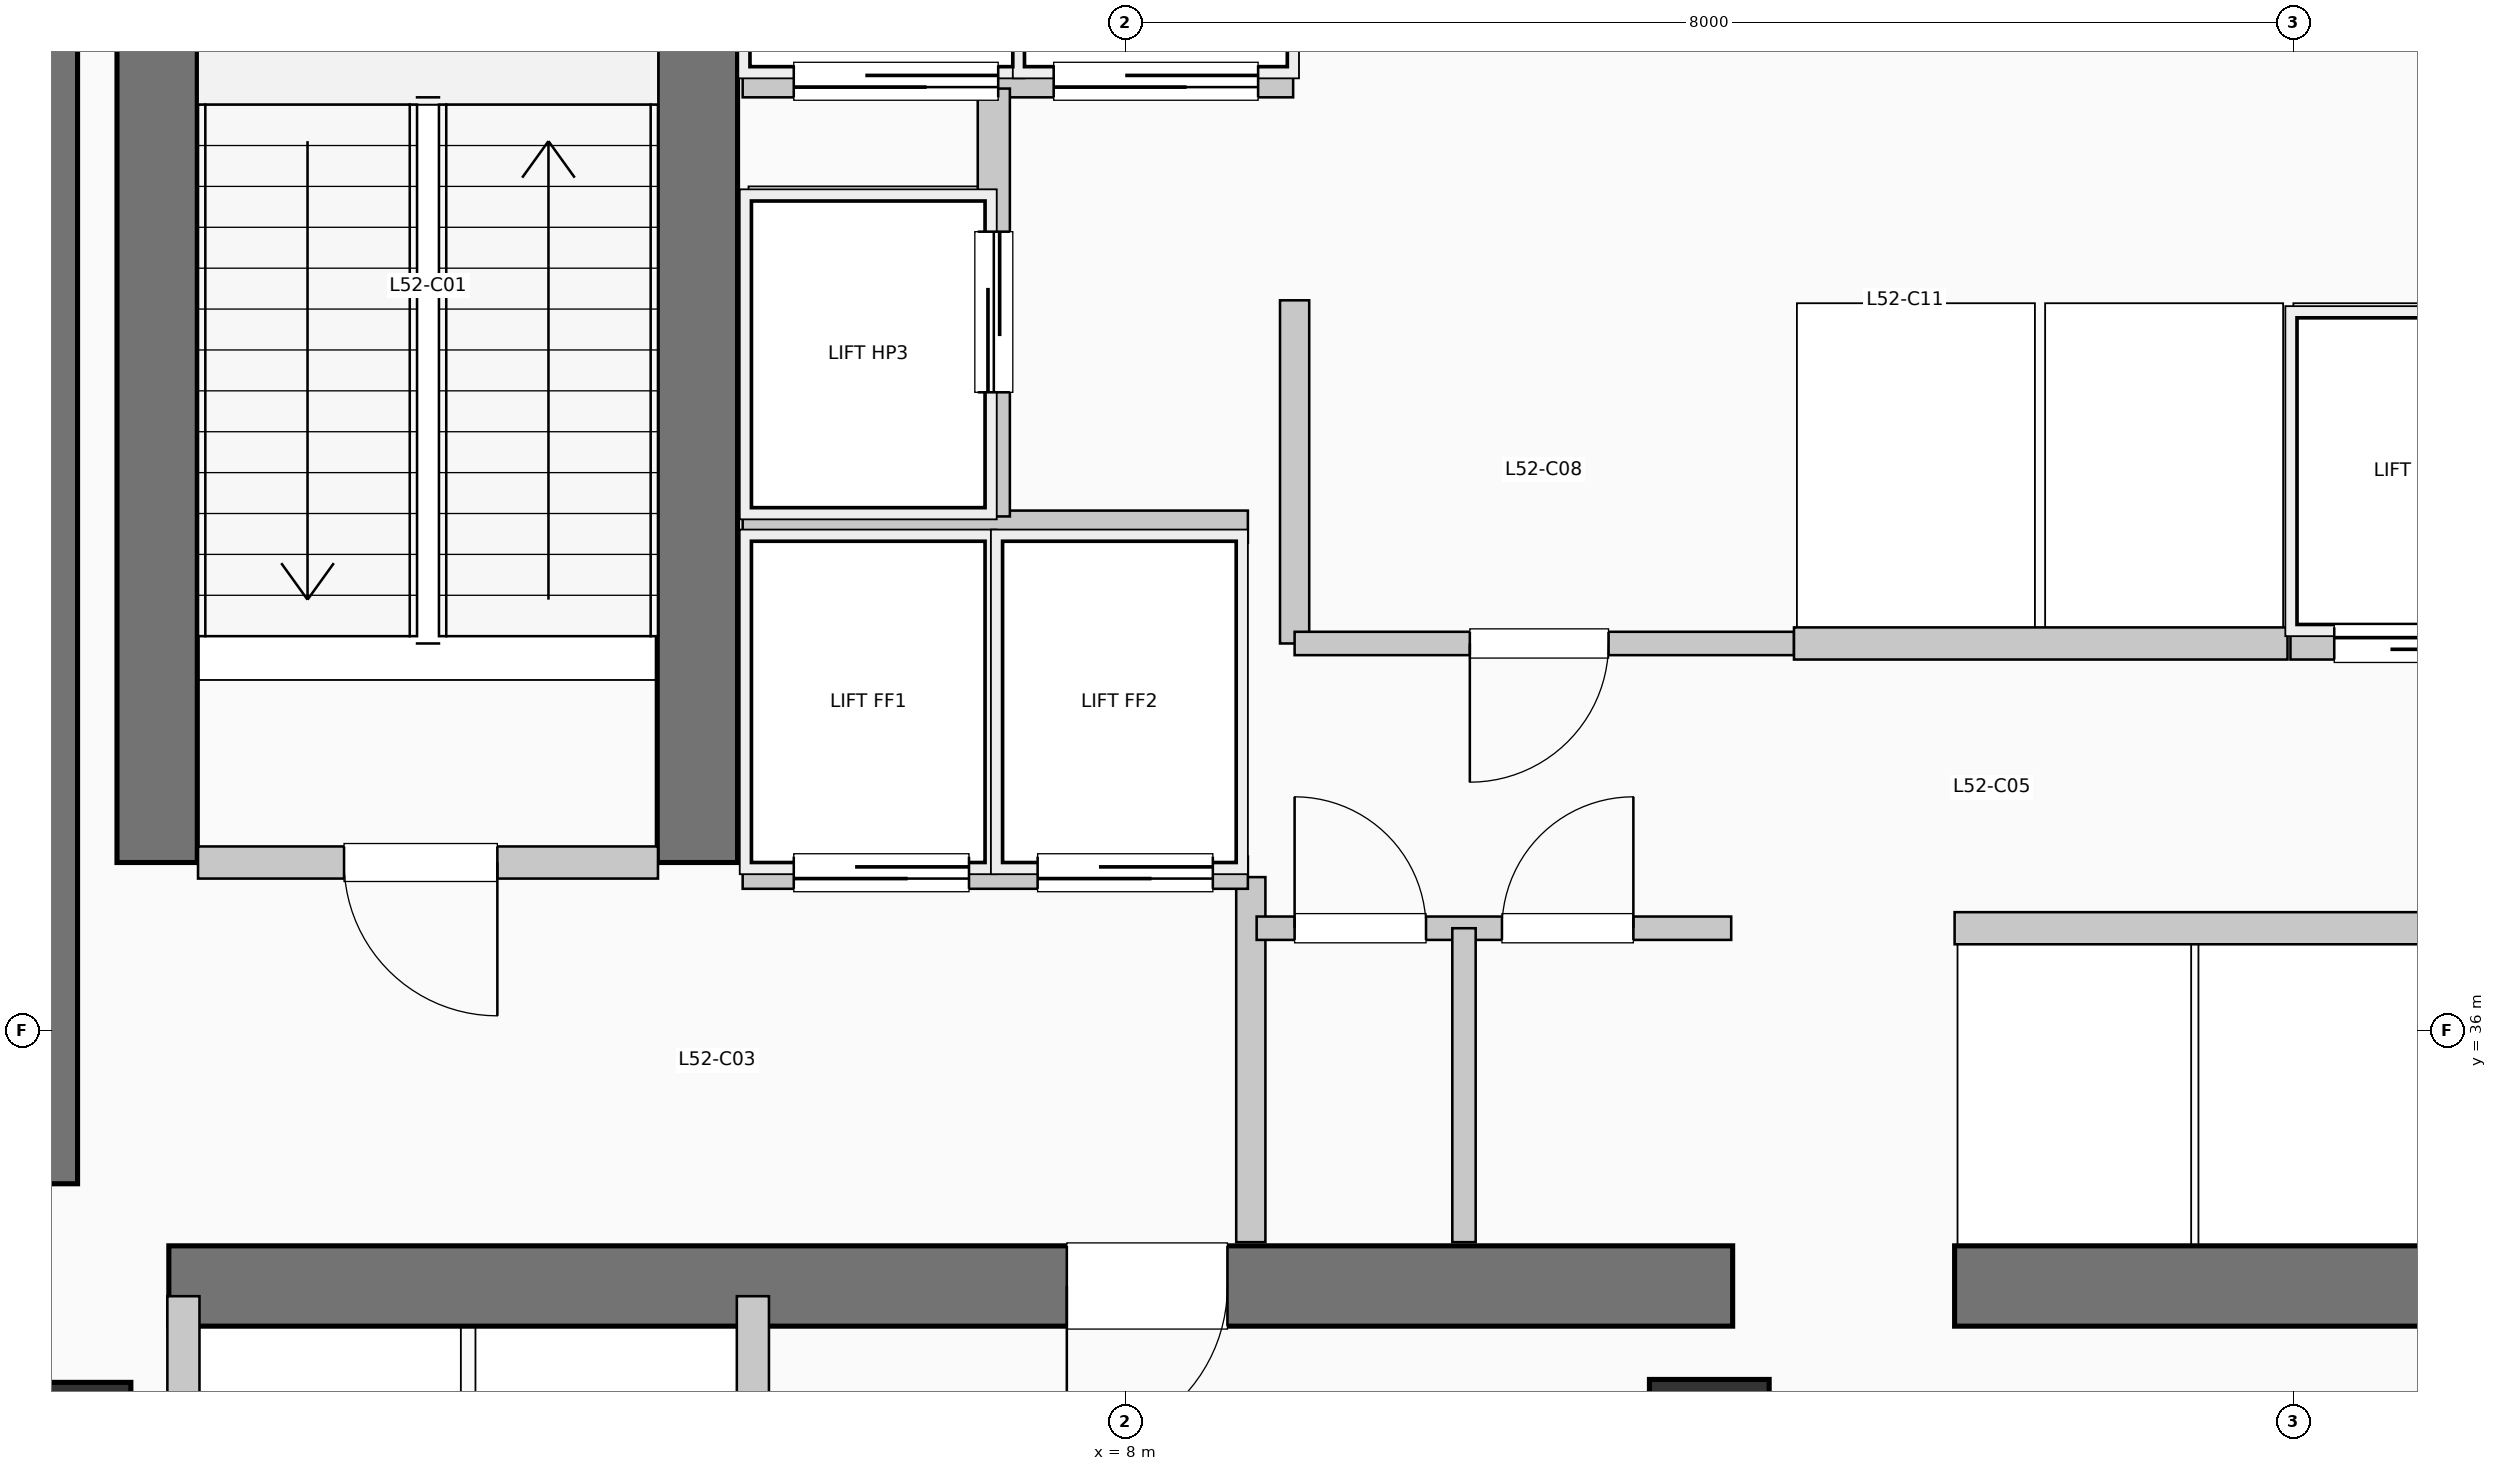
"""IFC4 building model, lengths in metres.
Left out: names, types, materials, properties, quantities, classifications, styles, units other than length and angle.
Written with IfcOpenShell. Run it as: python <this file> out.ifc"""

import sys

from ifc_helpers import new_model, si_unit, direction, frame, frame_2d, origin, origin_2d, place, context, subcontext, project, spatial, rectangle, extrude, element, fill, save


model = new_model("IFC4")
c1 = context("Model", 3, precision=1e-05, world=origin(), true_north=direction((0.0, 1.0)))
c2 = subcontext(c1, "Body", "Model", "MODEL_VIEW")
j1 = project(units=[si_unit("LENGTHUNIT", "METRE"), si_unit("PLANEANGLEUNIT", "RADIAN")], contexts=[c1])
p1 = place(None, origin())
s1 = spatial("IfcSite", under=j1, at=p1, CompositionType="ELEMENT")
p2 = place(p1, origin())
s2 = spatial("IfcBuilding", under=s1, at=p2, CompositionType="ELEMENT")
p3 = place(p2, frame((0.0, 0.0, 215.16)))
s3 = spatial("IfcBuildingStorey", under=s2, at=p3, CompositionType="ELEMENT", Elevation=215.16)
p4 = place(p3, frame((0.5, 34.95, 0.0), z_axis=(0.0, 0.0, 1.0), x_axis=(0.0, 1.0, 0.0)))
e1 = element("IfcWall", 1, at=p4, inside=s3, PredefinedType="SHEAR", context=c2, shape_type="SweptSolid", body=[
    extrude(rectangle(XDim=7.9, YDim=0.65, at=frame_2d((3.95, 0.0))), origin(), (0.0, 0.0, 1.0), 4.62),
])
p5 = place(p3, frame((1.45, 34.25, 0.0), z_axis=(0.0, 0.0, 1.0), x_axis=(1.0, 0.0, 0.0)))
e2 = element("IfcWall", 2, at=p5, inside=s3, PredefinedType="SHEAR", context=c2, shape_type="SweptSolid", body=[
    extrude(rectangle(XDim=10.71, YDim=0.55, at=frame_2d((5.355, 0.0))), origin(), (0.0, 0.0, 1.0), 4.62),
])
p6 = place(p5, frame((7.25, 0.0, 0.0), z_axis=(0.0, 0.0, 1.0), x_axis=(-1.0, 0.0, 0.0)))
e3 = element("IfcOpeningElement", 3, at=p6, cuts=e2, PredefinedType="OPENING", context=c2, shape_type="SweptSolid", body=[
    extrude(rectangle(XDim=1.1, YDim=2.15, at=frame_2d((0.55, 1.075))), frame((0.0, 0.285, 0.0), z_axis=(0.0, -1.0, 0.0), x_axis=(1.0, 0.0, 0.0)), (0.0, 0.0, 1.0), 0.57),
])
p7 = place(p3, frame((13.68, 34.25, 0.0), z_axis=(0.0, 0.0, 1.0), x_axis=(1.0, 0.0, 0.0)))
e4 = element("IfcWall", 4, at=p7, inside=s3, PredefinedType="SHEAR", context=c2, shape_type="SweptSolid", body=[
    extrude(rectangle(XDim=6.12, YDim=0.55, at=frame_2d((3.06, 0.0))), origin(), (0.0, 0.0, 1.0), 4.62),
])
for number, where, z_axis, x_axis in (
    (5, (1.37, 37.15, 0.0), (0.0, 0.0, 1.0), (0.0, 1.0, 0.0)),
    (6, (5.07, 37.15, 0.0), (0.0, 0.0, 1.0), (0.0, 1.0, 0.0)),
):
    element("IfcWall", number, at=place(p3, frame(where, z_axis=z_axis, x_axis=x_axis)), inside=s3, PredefinedType="SHEAR", context=c2, shape_type="SweptSolid", body=[
        extrude(rectangle(XDim=7.89, YDim=0.55, at=frame_2d((3.945, 0.0))), origin(), (0.0, 0.0, 1.0), 4.62),
    ])
p8 = place(p3, frame((0.8, 33.2, 0.0), z_axis=(0.0, 0.0, 1.0), x_axis=(1.0, 0.0, 0.0)))
e7 = element("IfcColumn", 7, at=p8, inside=s3, PredefinedType="COLUMN", context=c2, shape_type="SweptSolid", body=[
    extrude(rectangle(XDim=0.78, YDim=0.78, at=origin_2d()), origin(), (0.0, 0.0, 1.0), 4.62),
])
p9 = place(p3, frame((12.0, 33.2, 0.0), z_axis=(0.0, 0.0, 1.0), x_axis=(1.0, 0.0, 0.0)))
e8 = element("IfcColumn", 8, at=p9, inside=s3, PredefinedType="COLUMN", context=c2, shape_type="SweptSolid", body=[
    extrude(rectangle(XDim=0.82, YDim=0.82, at=origin_2d()), origin(), (0.0, 0.0, 1.0), 4.62),
])
p10 = place(p3, frame((1.65, 37.15, 0.0), z_axis=(0.0, 0.0, 1.0), x_axis=(1.0, 0.0, 0.0)))
e9 = element("IfcWall", 9, at=p10, inside=s3, PredefinedType="PARTITIONING", context=c2, shape_type="SweptSolid", body=[
    extrude(rectangle(XDim=3.15, YDim=0.22, at=frame_2d((1.575, 0.0))), origin(), (0.0, 0.0, 1.0), 4.37),
])
p11 = place(p10, frame((2.05, 0.0, 0.0), z_axis=(0.0, 0.0, 1.0), x_axis=(-1.0, 0.0, 0.0)))
e10 = element("IfcOpeningElement", 10, at=p11, cuts=e9, PredefinedType="OPENING", context=c2, shape_type="SweptSolid", body=[
    extrude(rectangle(XDim=1.05, YDim=2.15, at=frame_2d((0.525, 1.075))), frame((0.0, 0.12, 0.0), z_axis=(0.0, -1.0, 0.0), x_axis=(1.0, 0.0, 0.0)), (0.0, 0.0, 1.0), 0.24),
])
p12 = place(p3, frame((8.86, 34.55, 0.0), z_axis=(0.0, 0.0, 1.0), x_axis=(0.0, 1.0, 0.0)))
e11 = element("IfcWall", 11, at=p12, inside=s3, PredefinedType="PARTITIONING", context=c2, shape_type="SweptSolid", body=[
    extrude(rectangle(XDim=2.5, YDim=0.2, at=frame_2d((1.25, 0.0))), origin(), (0.0, 0.0, 1.0), 4.37),
])
p13 = place(p3, frame((5.38, 37.08, 0.0), z_axis=(0.0, 0.0, 1.0), x_axis=(1.0, 0.0, 0.0)))
e12 = element("IfcWall", 12, at=p13, inside=s3, PredefinedType="PARTITIONING", context=c2, shape_type="SweptSolid", body=[
    extrude(rectangle(XDim=3.46, YDim=0.22, at=frame_2d((1.73, 0.0))), origin(), (0.0, 0.0, 1.0), 4.37),
])
p14 = place(p13, frame((1.55, 0.0, 0.0), z_axis=(0.0, 0.0, 1.0), x_axis=(-1.0, 0.0, 0.0)))
e13 = element("IfcOpeningElement", 13, at=p14, cuts=e12, PredefinedType="OPENING", context=c2, shape_type="SweptSolid", body=[
    extrude(rectangle(XDim=1.2, YDim=2.2, at=frame_2d((0.6, 1.1))), frame((0.0, 0.12, 0.0), z_axis=(0.0, -1.0, 0.0), x_axis=(1.0, 0.0, 0.0)), (0.0, 0.0, 1.0), 0.24),
])
p15 = place(p13, frame((3.22, 0.0, 0.0), z_axis=(0.0, 0.0, 1.0), x_axis=(-1.0, 0.0, 0.0)))
e14 = element("IfcOpeningElement", 14, at=p15, cuts=e12, PredefinedType="OPENING", context=c2, shape_type="SweptSolid", body=[
    extrude(rectangle(XDim=1.2, YDim=2.2, at=frame_2d((0.6, 1.1))), frame((0.0, 0.12, 0.0), z_axis=(0.0, -1.0, 0.0), x_axis=(1.0, 0.0, 0.0)), (0.0, 0.0, 1.0), 0.24),
])
p16 = place(p3, frame((5.38, 39.45, 0.0), z_axis=(0.0, 0.0, 1.0), x_axis=(1.0, 0.0, 0.0)))
e15 = element("IfcWall", 15, at=p16, inside=s3, PredefinedType="PARTITIONING", context=c2, shape_type="SweptSolid", body=[
    extrude(rectangle(XDim=3.46, YDim=0.22, at=frame_2d((1.73, 0.0))), origin(), (0.0, 0.0, 1.0), 4.37),
])
p17 = place(p3, frame((5.38, 42.5, 0.0), z_axis=(0.0, 0.0, 1.0), x_axis=(1.0, 0.0, 0.0)))
e16 = element("IfcWall", 16, at=p17, inside=s3, PredefinedType="PARTITIONING", context=c2, shape_type="SweptSolid", body=[
    extrude(rectangle(XDim=3.77, YDim=0.22, at=frame_2d((1.885, 0.0))), origin(), (0.0, 0.0, 1.0), 4.37),
])
p18 = place(p17, frame((1.75, 0.0, 0.0), z_axis=(0.0, 0.0, 1.0), x_axis=(-1.0, 0.0, 0.0)))
e17 = element("IfcOpeningElement", 17, at=p18, cuts=e16, PredefinedType="OPENING", context=c2, shape_type="SweptSolid", body=[
    extrude(rectangle(XDim=1.4, YDim=2.2, at=frame_2d((0.7, 1.1))), frame((0.0, 0.12, 0.0), z_axis=(0.0, -1.0, 0.0), x_axis=(1.0, 0.0, 0.0)), (0.0, 0.0, 1.0), 0.24),
])
p19 = place(p17, frame((3.53, 0.0, 0.0), z_axis=(0.0, 0.0, 1.0), x_axis=(-1.0, 0.0, 0.0)))
e18 = element("IfcOpeningElement", 18, at=p19, cuts=e16, PredefinedType="OPENING", context=c2, shape_type="SweptSolid", body=[
    extrude(rectangle(XDim=1.4, YDim=2.2, at=frame_2d((0.7, 1.1))), frame((0.0, 0.12, 0.0), z_axis=(0.0, -1.0, 0.0), x_axis=(1.0, 0.0, 0.0)), (0.0, 0.0, 1.0), 0.24),
])
p20 = place(p3, frame((7.1, 39.52, 0.0), z_axis=(0.0, 0.0, 1.0), x_axis=(0.0, 1.0, 0.0)))
e19 = element("IfcWall", 19, at=p20, inside=s3, PredefinedType="PARTITIONING", context=c2, shape_type="SweptSolid", body=[
    extrude(rectangle(XDim=2.93, YDim=0.22, at=frame_2d((1.465, 0.0))), origin(), (0.0, 0.0, 1.0), 4.37),
])
p21 = place(p20, frame((0.85, 0.0, 0.0)))
e20 = element("IfcOpeningElement", 20, at=p21, cuts=e19, PredefinedType="OPENING", context=c2, shape_type="SweptSolid", body=[
    extrude(rectangle(XDim=1.1, YDim=2.2, at=frame_2d((0.55, 1.1))), frame((0.0, 0.12, 0.0), z_axis=(0.0, -1.0, 0.0), x_axis=(1.0, 0.0, 0.0)), (0.0, 0.0, 1.0), 0.24),
])
for number, where, z_axis, x_axis in (
    (21, (1.55, 31.8, 0.0), (0.0, 0.0, 1.0), (0.0, 1.0, 0.0)),
    (22, (5.45, 31.8, 0.0), (0.0, 0.0, 1.0), (0.0, 1.0, 0.0)),
):
    element("IfcWall", number, at=place(p3, frame(where, z_axis=z_axis, x_axis=x_axis)), inside=s3, PredefinedType="PARTITIONING", context=c2, shape_type="SweptSolid", body=[
        extrude(rectangle(XDim=2.38, YDim=0.22, at=frame_2d((1.19, 0.0))), origin(), (0.0, 0.0, 1.0), 4.37),
    ])
p22 = place(p3, frame((9.16, 38.65, 0.0), z_axis=(0.0, 0.0, 1.0), x_axis=(0.0, 1.0, 0.0)))
e23 = element("IfcWall", 23, at=p22, inside=s3, PredefinedType="PARTITIONING", context=c2, shape_type="SweptSolid", body=[
    extrude(rectangle(XDim=2.35, YDim=0.2, at=frame_2d((1.175, 0.0))), origin(), (0.0, 0.0, 1.0), 4.37),
])
p23 = place(p3, frame((8.9, 36.7, 0.0), z_axis=(0.0, 0.0, 1.0), x_axis=(1.0, 0.0, 0.0)))
e24 = element("IfcWall", 24, at=p23, inside=s3, PredefinedType="PARTITIONING", context=c2, shape_type="SweptSolid", body=[
    extrude(rectangle(XDim=3.25, YDim=0.16, at=frame_2d((1.625, 0.0))), origin(), (0.0, 0.0, 1.0), 4.37),
])
p24 = place(p23, frame((0.26, 0.0, 0.0)))
e25 = element("IfcOpeningElement", 25, at=p24, cuts=e24, PredefinedType="OPENING", context=c2, shape_type="SweptSolid", body=[
    extrude(rectangle(XDim=0.9, YDim=2.15, at=frame_2d((0.45, 1.075))), frame((0.0, 0.09, 0.0), z_axis=(0.0, -1.0, 0.0), x_axis=(1.0, 0.0, 0.0)), (0.0, 0.0, 1.0), 0.18),
])
p25 = place(p23, frame((1.68, 0.0, 0.0)))
e26 = element("IfcOpeningElement", 26, at=p25, cuts=e24, PredefinedType="OPENING", context=c2, shape_type="SweptSolid", body=[
    extrude(rectangle(XDim=0.9, YDim=2.15, at=frame_2d((0.45, 1.075))), frame((0.0, 0.09, 0.0), z_axis=(0.0, -1.0, 0.0), x_axis=(1.0, 0.0, 0.0)), (0.0, 0.0, 1.0), 0.18),
])
p26 = place(p3, frame((10.32, 34.55, 0.0), z_axis=(0.0, 0.0, 1.0), x_axis=(0.0, 1.0, 0.0)))
e27 = element("IfcWall", 27, at=p26, inside=s3, PredefinedType="PARTITIONING", context=c2, shape_type="SweptSolid", body=[
    extrude(rectangle(XDim=2.15, YDim=0.16, at=frame_2d((1.075, 0.0))), origin(), (0.0, 0.0, 1.0), 4.37),
])
p27 = place(p3, frame((9.16, 38.65, 0.0), z_axis=(0.0, 0.0, 1.0), x_axis=(1.0, 0.0, 0.0)))
e28 = element("IfcWall", 28, at=p27, inside=s3, PredefinedType="PARTITIONING", context=c2, shape_type="SweptSolid", body=[
    extrude(rectangle(XDim=3.42, YDim=0.16, at=frame_2d((1.71, 0.0))), origin(), (0.0, 0.0, 1.0), 4.37),
])
p28 = place(p27, frame((2.15, 0.0, 0.0), z_axis=(0.0, 0.0, 1.0), x_axis=(-1.0, 0.0, 0.0)))
e29 = element("IfcOpeningElement", 29, at=p28, cuts=e28, PredefinedType="OPENING", context=c2, shape_type="SweptSolid", body=[
    extrude(rectangle(XDim=0.95, YDim=2.15, at=frame_2d((0.475, 1.075))), frame((0.0, 0.09, 0.0), z_axis=(0.0, -1.0, 0.0), x_axis=(1.0, 0.0, 0.0)), (0.0, 0.0, 1.0), 0.18),
])
p29 = place(p3, frame((13.68, 36.7, 0.0), z_axis=(0.0, 0.0, 1.0), x_axis=(1.0, 0.0, 0.0)))
e30 = element("IfcWall", 30, at=p29, inside=s3, PredefinedType="PARTITIONING", context=c2, shape_type="SweptSolid", body=[
    extrude(rectangle(XDim=3.28, YDim=0.22, at=frame_2d((1.64, 0.0))), origin(), (0.0, 0.0, 1.0), 4.37),
])
p30 = place(p3, frame((12.58, 38.65, 0.0), z_axis=(0.0, 0.0, 1.0), x_axis=(1.0, 0.0, 0.0)))
e31 = element("IfcWall", 31, at=p30, inside=s3, PredefinedType="PARTITIONING", context=c2, shape_type="SweptSolid", body=[
    extrude(rectangle(XDim=3.38, YDim=0.22, at=frame_2d((1.69, 0.0))), origin(), (0.0, 0.0, 1.0), 4.37),
])
p31 = place(p3, frame((15.98, 38.65, 0.0), z_axis=(0.0, 0.0, 1.0), x_axis=(1.0, 0.0, 0.0)))
e32 = element("IfcWall", 32, at=p31, inside=s3, PredefinedType="PARTITIONING", context=c2, shape_type="SweptSolid", body=[
    extrude(rectangle(XDim=1.72, YDim=0.22, at=frame_2d((0.86, 0.0))), origin(), (0.0, 0.0, 1.0), 4.37),
])
p32 = place(p31, frame((0.3, 0.0, 0.0)))
e33 = element("IfcOpeningElement", 33, at=p32, cuts=e32, PredefinedType="OPENING", context=c2, shape_type="SweptSolid", body=[
    extrude(rectangle(XDim=1.1, YDim=2.2, at=frame_2d((0.55, 1.1))), frame((0.0, 0.12, 0.0), z_axis=(0.0, -1.0, 0.0), x_axis=(1.0, 0.0, 0.0)), (0.0, 0.0, 1.0), 0.24),
])
p33 = place(p11, origin())
e34 = element("IfcDoor", 34, at=p33, inside=s3, OperationType="SINGLE_SWING_RIGHT", PredefinedType="DOOR", context=c2, shape_type="SweptSolid", body=[
    extrude(rectangle(XDim=1.05, YDim=2.15, at=frame_2d((0.525, 1.075))), frame((0.0, 0.025, 0.0), z_axis=(0.0, -1.0, 0.0), x_axis=(1.0, 0.0, 0.0)), (0.0, 0.0, 1.0), 0.05),
])
fill(e10, e34)
p34 = place(p6, origin())
e35 = element("IfcDoor", 35, at=p34, inside=s3, OperationType="SINGLE_SWING_LEFT", PredefinedType="DOOR", context=c2, shape_type="SweptSolid", body=[
    extrude(rectangle(XDim=1.1, YDim=2.15, at=frame_2d((0.55, 1.075))), frame((0.0, 0.025, 0.0), z_axis=(0.0, -1.0, 0.0), x_axis=(1.0, 0.0, 0.0)), (0.0, 0.0, 1.0), 0.05),
])
fill(e3, e35)
p35 = place(p14, origin())
e36 = element("IfcDoor", 36, at=p35, inside=s3, OperationType="SLIDING_TO_RIGHT", PredefinedType="DOOR", context=c2, shape_type="SweptSolid", body=[
    extrude(rectangle(XDim=1.2, YDim=2.2, at=frame_2d((0.6, 1.1))), frame((0.0, 0.025, 0.0), z_axis=(0.0, -1.0, 0.0), x_axis=(1.0, 0.0, 0.0)), (0.0, 0.0, 1.0), 0.05),
])
fill(e13, e36)
p36 = place(p15, origin())
e37 = element("IfcDoor", 37, at=p36, inside=s3, OperationType="SLIDING_TO_RIGHT", PredefinedType="DOOR", context=c2, shape_type="SweptSolid", body=[
    extrude(rectangle(XDim=1.2, YDim=2.2, at=frame_2d((0.6, 1.1))), frame((0.0, 0.025, 0.0), z_axis=(0.0, -1.0, 0.0), x_axis=(1.0, 0.0, 0.0)), (0.0, 0.0, 1.0), 0.05),
])
fill(e14, e37)
p37 = place(p18, origin())
e38 = element("IfcDoor", 38, at=p37, inside=s3, OperationType="SLIDING_TO_LEFT", PredefinedType="DOOR", context=c2, shape_type="SweptSolid", body=[
    extrude(rectangle(XDim=1.4, YDim=2.2, at=frame_2d((0.7, 1.1))), frame((0.0, 0.025, 0.0), z_axis=(0.0, -1.0, 0.0), x_axis=(1.0, 0.0, 0.0)), (0.0, 0.0, 1.0), 0.05),
])
fill(e17, e38)
p38 = place(p19, origin())
e39 = element("IfcDoor", 39, at=p38, inside=s3, OperationType="SLIDING_TO_LEFT", PredefinedType="DOOR", context=c2, shape_type="SweptSolid", body=[
    extrude(rectangle(XDim=1.4, YDim=2.2, at=frame_2d((0.7, 1.1))), frame((0.0, 0.025, 0.0), z_axis=(0.0, -1.0, 0.0), x_axis=(1.0, 0.0, 0.0)), (0.0, 0.0, 1.0), 0.05),
])
fill(e18, e39)
p39 = place(p21, origin())
e40 = element("IfcDoor", 40, at=p39, inside=s3, OperationType="SLIDING_TO_LEFT", PredefinedType="DOOR", context=c2, shape_type="SweptSolid", body=[
    extrude(rectangle(XDim=1.1, YDim=2.2, at=frame_2d((0.55, 1.1))), frame((0.0, 0.025, 0.0), z_axis=(0.0, -1.0, 0.0), x_axis=(1.0, 0.0, 0.0)), (0.0, 0.0, 1.0), 0.05),
])
fill(e20, e40)
p40 = place(p24, origin())
e41 = element("IfcDoor", 41, at=p40, inside=s3, OperationType="SINGLE_SWING_LEFT", PredefinedType="DOOR", context=c2, shape_type="SweptSolid", body=[
    extrude(rectangle(XDim=0.9, YDim=2.15, at=frame_2d((0.45, 1.075))), frame((0.0, 0.025, 0.0), z_axis=(0.0, -1.0, 0.0), x_axis=(1.0, 0.0, 0.0)), (0.0, 0.0, 1.0), 0.05),
])
fill(e25, e41)
p41 = place(p25, origin())
e42 = element("IfcDoor", 42, at=p41, inside=s3, OperationType="SINGLE_SWING_RIGHT", PredefinedType="DOOR", context=c2, shape_type="SweptSolid", body=[
    extrude(rectangle(XDim=0.9, YDim=2.15, at=frame_2d((0.45, 1.075))), frame((0.0, 0.025, 0.0), z_axis=(0.0, -1.0, 0.0), x_axis=(1.0, 0.0, 0.0)), (0.0, 0.0, 1.0), 0.05),
])
fill(e26, e42)
p42 = place(p28, origin())
e43 = element("IfcDoor", 43, at=p42, inside=s3, OperationType="SINGLE_SWING_LEFT", PredefinedType="DOOR", context=c2, shape_type="SweptSolid", body=[
    extrude(rectangle(XDim=0.95, YDim=2.15, at=frame_2d((0.475, 1.075))), frame((0.0, 0.025, 0.0), z_axis=(0.0, -1.0, 0.0), x_axis=(1.0, 0.0, 0.0)), (0.0, 0.0, 1.0), 0.05),
])
fill(e29, e43)
p43 = place(p32, origin())
e44 = element("IfcDoor", 44, at=p43, inside=s3, OperationType="SLIDING_TO_LEFT", PredefinedType="DOOR", context=c2, shape_type="SweptSolid", body=[
    extrude(rectangle(XDim=1.1, YDim=2.2, at=frame_2d((0.55, 1.1))), frame((0.0, 0.025, 0.0), z_axis=(0.0, -1.0, 0.0), x_axis=(1.0, 0.0, 0.0)), (0.0, 0.0, 1.0), 0.05),
])
fill(e33, e44)
save(model, sys.argv[1])
